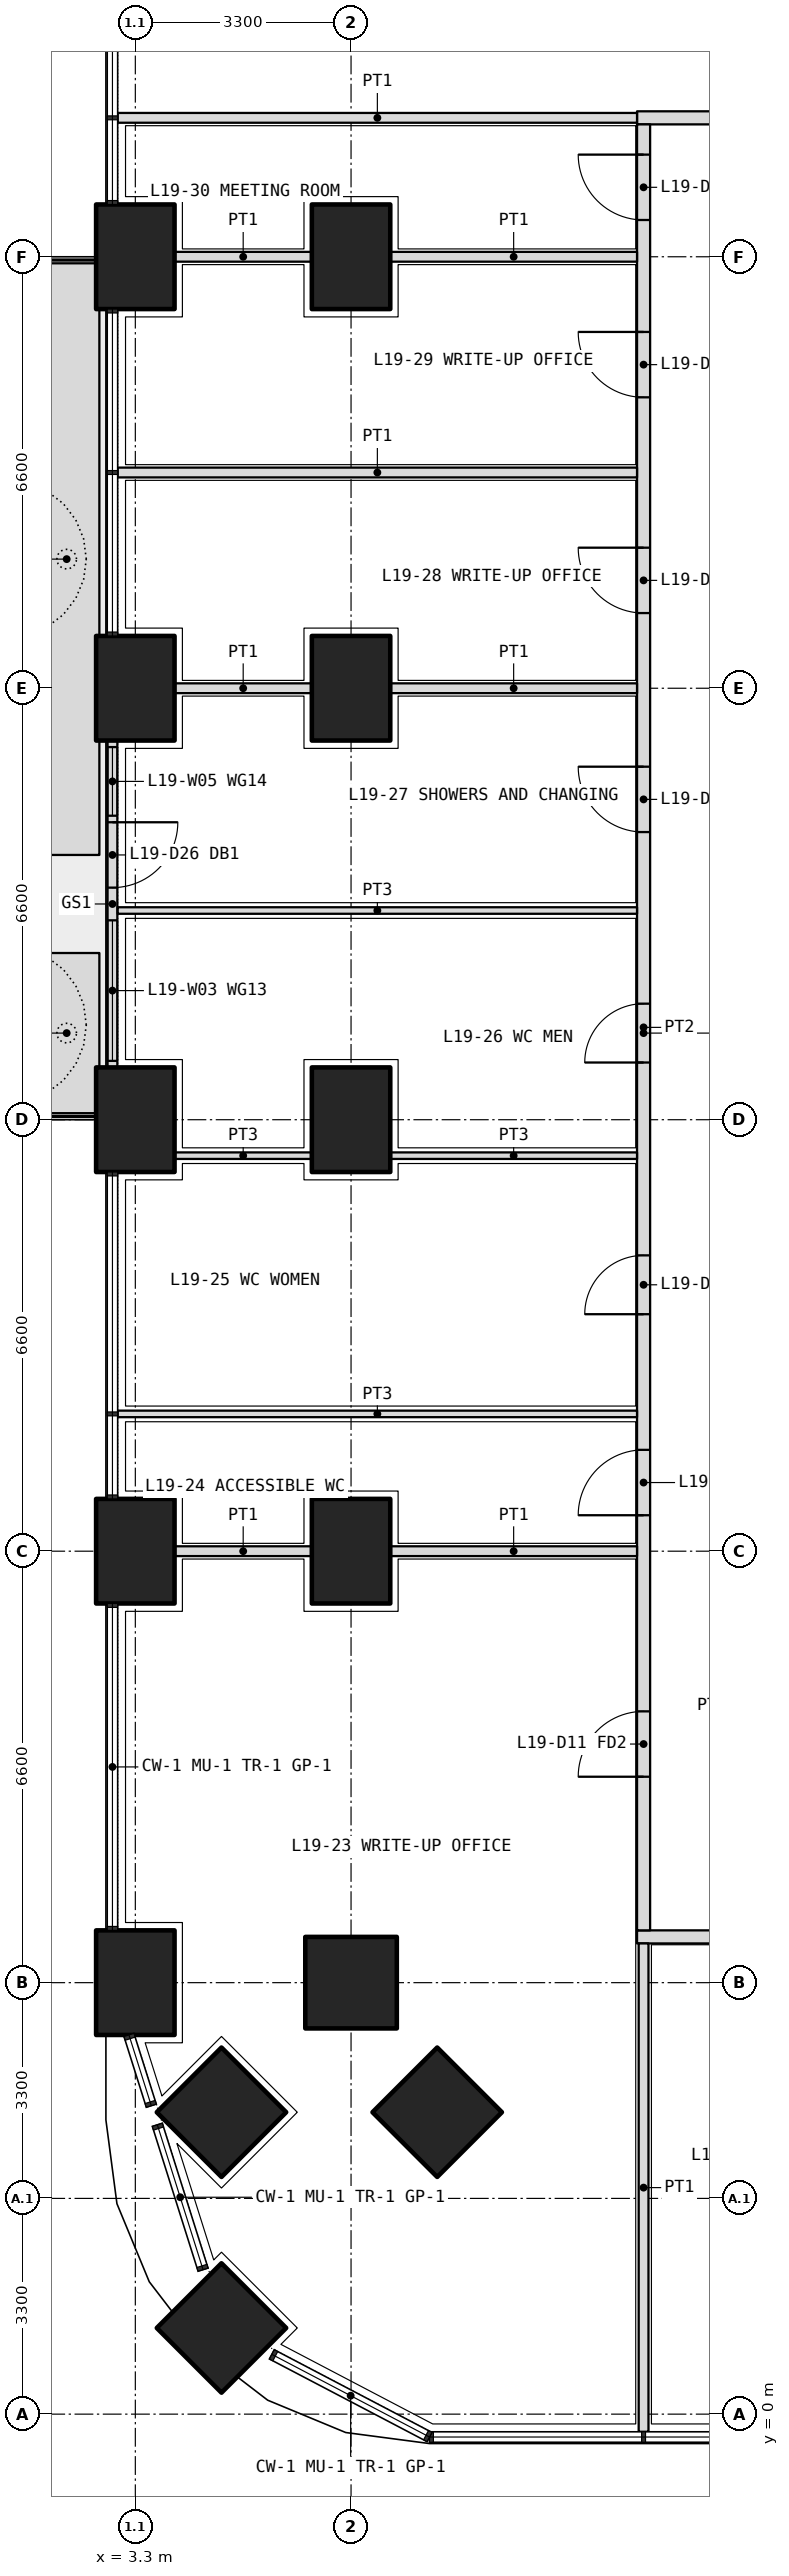
"""IFC4 building model, lengths in metres.
Left out: names, types, materials, properties, quantities, classifications, styles, units other than length and angle.
Written with IfcOpenShell. Run it as: python <this file> out.ifc"""

import sys

from ifc_helpers import new_model, si_unit, direction, frame, frame_2d, origin, origin_2d, place, context, subcontext, project, spatial, polyline, rectangle, outline, extrude, element, fill, save


model = new_model("IFC4")
c1 = context("Model", 3, precision=1e-05, world=origin(), true_north=direction((0.0, 1.0)))
c2 = subcontext(c1, "Body", "Model", "MODEL_VIEW")
j1 = project(units=[si_unit("LENGTHUNIT", "METRE"), si_unit("PLANEANGLEUNIT", "RADIAN")], contexts=[c1])
p1 = place(None, origin())
s1 = spatial("IfcSite", under=j1, at=p1, CompositionType="ELEMENT")
p2 = place(p1, origin())
s2 = spatial("IfcBuilding", under=s1, at=p2, CompositionType="ELEMENT")
p3 = place(p2, frame((0.0, 0.0, 86.4)))
s3 = spatial("IfcBuildingStorey", under=s2, at=p3, CompositionType="ELEMENT", Elevation=86.4)
p4 = place(p3, frame((4.618, 1.318, 0.0), z_axis=(0.0, 0.0, 1.0), x_axis=(0.707106781187, 0.707106781187, 0.0)))
e1 = element("IfcColumn", 1, at=p4, inside=s3, PredefinedType="COLUMN", context=c2, shape_type="SweptSolid", body=[
    extrude(rectangle(XDim=1.4, YDim=1.4, at=origin_2d()), origin(), (0.0, 0.0, 1.0), 4.2),
])
for number, where, z_axis, x_axis in (
    (2, (3.3, 6.6, 0.0), (0.0, 0.0, 1.0), (0.0, 1.0, 0.0)),
    (3, (3.3, 13.2, 0.0), (0.0, 0.0, 1.0), (0.0, 1.0, 0.0)),
    (4, (3.3, 19.8, 0.0), (0.0, 0.0, 1.0), (0.0, 1.0, 0.0)),
    (5, (3.3, 26.4, 0.0), (0.0, 0.0, 1.0), (0.0, 1.0, 0.0)),
    (6, (3.3, 33.0, 0.0), (0.0, 0.0, 1.0), (0.0, 1.0, 0.0)),
):
    element("IfcColumn", number, at=place(p3, frame(where, z_axis=z_axis, x_axis=x_axis)), inside=s3, PredefinedType="COLUMN", context=c2, shape_type="SweptSolid", body=[
        extrude(rectangle(XDim=1.6, YDim=1.2, at=origin_2d()), origin(), (0.0, 0.0, 1.0), 4.2),
    ])
for number, where, z_axis, x_axis in (
    (7, (6.6, 6.6, 0.0), (0.0, 0.0, 1.0), (1.0, 0.0, 0.0)),
    (8, (4.618, 4.618, 0.0), (0.0, 0.0, 1.0), (0.707, 0.707, 0.0)),
    (9, (7.918, 4.618, 0.0), (0.0, 0.0, 1.0), (0.707, 0.707, 0.0)),
):
    element("IfcColumn", number, at=place(p3, frame(where, z_axis=z_axis, x_axis=x_axis)), inside=s3, PredefinedType="COLUMN", context=c2, shape_type="SweptSolid", body=[
        extrude(rectangle(XDim=1.4, YDim=1.4, at=origin_2d()), origin(), (0.0, 0.0, 1.0), 4.2),
    ])
for number, where, z_axis, x_axis in (
    (10, (6.6, 13.2, 0.0), (0.0, 0.0, 1.0), (0.0, 1.0, 0.0)),
    (11, (6.6, 19.8, 0.0), (0.0, 0.0, 1.0), (0.0, 1.0, 0.0)),
    (12, (6.6, 26.4, 0.0), (0.0, 0.0, 1.0), (0.0, 1.0, 0.0)),
    (13, (6.6, 33.0, 0.0), (0.0, 0.0, 1.0), (0.0, 1.0, 0.0)),
):
    element("IfcColumn", number, at=place(p3, frame(where, z_axis=z_axis, x_axis=x_axis)), inside=s3, PredefinedType="COLUMN", context=c2, shape_type="SweptSolid", body=[
        extrude(rectangle(XDim=1.6, YDim=1.2, at=origin_2d()), origin(), (0.0, 0.0, 1.0), 4.2),
    ])
p5 = place(p3, origin())
e14 = element("IfcWall", 14, at=p5, inside=s3, PredefinedType="USERDEFINED", context=c2, shape_type="SweptSolid", body=[
    extrude(outline(polyline([(1.75, 19.9), (2.75, 19.9), (2.75, 22.35), (1.75, 22.35), (1.75, 19.9)]), holes=[polyline([(1.9, 20.05), (2.6, 20.05), (2.6, 22.2), (1.9, 22.2), (1.9, 20.05)])]), origin(), (0.0, 0.0, 1.0), 1.05),
])
p6 = place(p3, origin())
e15 = element("IfcWall", 15, at=p6, inside=s3, PredefinedType="USERDEFINED", context=c2, shape_type="SweptSolid", body=[
    extrude(outline(polyline([(1.75, 23.85), (2.75, 23.85), (2.75, 32.9), (1.75, 32.9), (1.75, 23.85)]), holes=[polyline([(1.9, 24.0), (2.6, 24.0), (2.6, 32.75), (1.9, 32.75), (1.9, 24.0)])]), origin(), (0.0, 0.0, 1.0), 1.05),
])
p7 = place(p3, frame((2.95, 25.6, 0.0), z_axis=(0.0, 0.0, 1.0), x_axis=(0.0, -1.0, 0.0)))
e16 = element("IfcWall", 16, at=p7, inside=s3, PredefinedType="SOLIDWALL", context=c2, shape_type="SweptSolid", body=[
    extrude(rectangle(XDim=5.0, YDim=0.15, at=frame_2d((2.5, 0.0))), origin(), (0.0, 0.0, 1.0), 2.7),
])
p8 = place(p7, frame((1.25, 0.0, 0.0)))
e17 = element("IfcOpeningElement", 17, at=p8, cuts=e16, PredefinedType="OPENING", context=c2, shape_type="SweptSolid", body=[
    extrude(rectangle(XDim=1.0, YDim=2.4, at=frame_2d((0.5, 1.2))), frame((0.0, 0.085, 0.0), z_axis=(0.0, -1.0, 0.0), x_axis=(1.0, 0.0, 0.0)), (0.0, 0.0, 1.0), 0.17),
])
p9 = place(p7, frame((0.1, 0.0, 0.1)))
e18 = element("IfcOpeningElement", 18, at=p9, cuts=e16, PredefinedType="OPENING", context=c2, shape_type="SweptSolid", body=[
    extrude(rectangle(XDim=1.05, YDim=2.3, at=frame_2d((0.525, 1.15))), frame((0.0, 0.085, 0.0), z_axis=(0.0, -1.0, 0.0), x_axis=(1.0, 0.0, 0.0)), (0.0, 0.0, 1.0), 0.17),
])
p10 = place(p7, frame((2.75, 0.0, 0.1)))
e19 = element("IfcOpeningElement", 19, at=p10, cuts=e16, PredefinedType="OPENING", context=c2, shape_type="SweptSolid", body=[
    extrude(rectangle(XDim=2.15, YDim=2.3, at=frame_2d((1.075, 1.15))), frame((0.0, 0.085, 0.0), z_axis=(0.0, -1.0, 0.0), x_axis=(1.0, 0.0, 0.0)), (0.0, 0.0, 1.0), 0.17),
])
p11 = place(p3, frame((10.975, 7.3, 0.0), z_axis=(0.0, 0.0, 1.0), x_axis=(1.0, 0.0, 0.0)))
e20 = element("IfcWall", 20, at=p11, inside=s3, PredefinedType="PARTITIONING", context=c2, shape_type="SweptSolid", body=[
    extrude(rectangle(XDim=12.125, YDim=0.2, at=frame_2d((6.062, 0.0))), origin(), (0.0, 0.0, 1.0), 2.85),
])
p12 = place(p11, frame((2.312, 0.0, 0.0)))
e21 = element("IfcOpeningElement", 21, at=p12, cuts=e20, PredefinedType="OPENING", context=c2, shape_type="SweptSolid", body=[
    extrude(rectangle(XDim=1.0, YDim=2.1, at=frame_2d((0.5, 1.05))), frame((0.0, 0.11, 0.0), z_axis=(0.0, -1.0, 0.0), x_axis=(1.0, 0.0, 0.0)), (0.0, 0.0, 1.0), 0.22),
])
p13 = place(p11, frame((7.125, 0.0, 0.0)))
e22 = element("IfcOpeningElement", 22, at=p13, cuts=e20, PredefinedType="OPENING", context=c2, shape_type="SweptSolid", body=[
    extrude(rectangle(XDim=1.0, YDim=2.1, at=frame_2d((0.5, 1.05))), frame((0.0, 0.11, 0.0), z_axis=(0.0, -1.0, 0.0), x_axis=(1.0, 0.0, 0.0)), (0.0, 0.0, 1.0), 0.22),
])
p14 = place(p11, frame((10.425, 0.0, 0.0)))
e23 = element("IfcOpeningElement", 23, at=p14, cuts=e20, PredefinedType="OPENING", context=c2, shape_type="SweptSolid", body=[
    extrude(rectangle(XDim=1.0, YDim=2.1, at=frame_2d((0.5, 1.05))), frame((0.0, 0.11, 0.0), z_axis=(0.0, -1.0, 0.0), x_axis=(1.0, 0.0, 0.0)), (0.0, 0.0, 1.0), 0.22),
])
p15 = place(p3, frame((10.975, 35.125, 0.0), z_axis=(0.0, 0.0, 1.0), x_axis=(1.0, 0.0, 0.0)))
e24 = element("IfcWall", 24, at=p15, inside=s3, PredefinedType="PARTITIONING", context=c2, shape_type="SweptSolid", body=[
    extrude(rectangle(XDim=30.85, YDim=0.2, at=frame_2d((15.425, 0.0))), origin(), (0.0, 0.0, 1.0), 2.85),
])
p16 = place(p15, frame((3.962, 0.0, 0.0)))
e25 = element("IfcOpeningElement", 25, at=p16, cuts=e24, PredefinedType="OPENING", context=c2, shape_type="SweptSolid", body=[
    extrude(rectangle(XDim=1.0, YDim=2.1, at=frame_2d((0.5, 1.05))), frame((0.0, 0.11, 0.0), z_axis=(0.0, -1.0, 0.0), x_axis=(1.0, 0.0, 0.0)), (0.0, 0.0, 1.0), 0.22),
])
p17 = place(p15, frame((9.975, 0.0, 0.0)))
e26 = element("IfcOpeningElement", 26, at=p17, cuts=e24, PredefinedType="OPENING", context=c2, shape_type="SweptSolid", body=[
    extrude(rectangle(XDim=1.0, YDim=2.1, at=frame_2d((0.5, 1.05))), frame((0.0, 0.11, 0.0), z_axis=(0.0, -1.0, 0.0), x_axis=(1.0, 0.0, 0.0)), (0.0, 0.0, 1.0), 0.22),
])
p18 = place(p15, frame((14.825, 0.0, 0.0)))
e27 = element("IfcOpeningElement", 27, at=p18, cuts=e24, PredefinedType="OPENING", context=c2, shape_type="SweptSolid", body=[
    extrude(rectangle(XDim=1.2, YDim=2.1, at=frame_2d((0.6, 1.05))), frame((0.0, 0.11, 0.0), z_axis=(0.0, -1.0, 0.0), x_axis=(1.0, 0.0, 0.0)), (0.0, 0.0, 1.0), 0.22),
])
p19 = place(p15, frame((24.238, 0.0, 0.0)))
e28 = element("IfcOpeningElement", 28, at=p19, cuts=e24, PredefinedType="OPENING", context=c2, shape_type="SweptSolid", body=[
    extrude(rectangle(XDim=1.0, YDim=2.1, at=frame_2d((0.5, 1.05))), frame((0.0, 0.11, 0.0), z_axis=(0.0, -1.0, 0.0), x_axis=(1.0, 0.0, 0.0)), (0.0, 0.0, 1.0), 0.22),
])
p20 = place(p3, frame((11.075, 7.4, 0.0), z_axis=(0.0, 0.0, 1.0), x_axis=(0.0, 1.0, 0.0)))
e29 = element("IfcWall", 29, at=p20, inside=s3, PredefinedType="PARTITIONING", context=c2, shape_type="SweptSolid", body=[
    extrude(rectangle(XDim=27.625, YDim=0.2, at=frame_2d((13.812, 0.0))), origin(), (0.0, 0.0, 1.0), 2.85),
])
p21 = place(p20, frame((2.35, 0.0, 0.0)))
e30 = element("IfcOpeningElement", 30, at=p21, cuts=e29, PredefinedType="OPENING", context=c2, shape_type="SweptSolid", body=[
    extrude(rectangle(XDim=1.0, YDim=2.1, at=frame_2d((0.5, 1.05))), frame((0.0, 0.11, 0.0), z_axis=(0.0, -1.0, 0.0), x_axis=(1.0, 0.0, 0.0)), (0.0, 0.0, 1.0), 0.22),
])
p22 = place(p20, frame((6.35, 0.0, 0.0)))
e31 = element("IfcOpeningElement", 31, at=p22, cuts=e29, PredefinedType="OPENING", context=c2, shape_type="SweptSolid", body=[
    extrude(rectangle(XDim=1.0, YDim=2.1, at=frame_2d((0.5, 1.05))), frame((0.0, 0.11, 0.0), z_axis=(0.0, -1.0, 0.0), x_axis=(1.0, 0.0, 0.0)), (0.0, 0.0, 1.0), 0.22),
])
p23 = place(p20, frame((9.425, 0.0, 0.0)))
e32 = element("IfcOpeningElement", 32, at=p23, cuts=e29, PredefinedType="OPENING", context=c2, shape_type="SweptSolid", body=[
    extrude(rectangle(XDim=0.9, YDim=2.1, at=frame_2d((0.45, 1.05))), frame((0.0, 0.11, 0.0), z_axis=(0.0, -1.0, 0.0), x_axis=(1.0, 0.0, 0.0)), (0.0, 0.0, 1.0), 0.22),
])
p24 = place(p20, frame((13.275, 0.0, 0.0)))
e33 = element("IfcOpeningElement", 33, at=p24, cuts=e29, PredefinedType="OPENING", context=c2, shape_type="SweptSolid", body=[
    extrude(rectangle(XDim=0.9, YDim=2.1, at=frame_2d((0.45, 1.05))), frame((0.0, 0.11, 0.0), z_axis=(0.0, -1.0, 0.0), x_axis=(1.0, 0.0, 0.0)), (0.0, 0.0, 1.0), 0.22),
])
p25 = place(p20, frame((16.8, 0.0, 0.0)))
e34 = element("IfcOpeningElement", 34, at=p25, cuts=e29, PredefinedType="OPENING", context=c2, shape_type="SweptSolid", body=[
    extrude(rectangle(XDim=1.0, YDim=2.1, at=frame_2d((0.5, 1.05))), frame((0.0, 0.11, 0.0), z_axis=(0.0, -1.0, 0.0), x_axis=(1.0, 0.0, 0.0)), (0.0, 0.0, 1.0), 0.22),
])
p26 = place(p20, frame((20.15, 0.0, 0.0)))
e35 = element("IfcOpeningElement", 35, at=p26, cuts=e29, PredefinedType="OPENING", context=c2, shape_type="SweptSolid", body=[
    extrude(rectangle(XDim=1.0, YDim=2.1, at=frame_2d((0.5, 1.05))), frame((0.0, 0.11, 0.0), z_axis=(0.0, -1.0, 0.0), x_axis=(1.0, 0.0, 0.0)), (0.0, 0.0, 1.0), 0.22),
])
p27 = place(p20, frame((23.45, 0.0, 0.0)))
e36 = element("IfcOpeningElement", 36, at=p27, cuts=e29, PredefinedType="OPENING", context=c2, shape_type="SweptSolid", body=[
    extrude(rectangle(XDim=1.0, YDim=2.1, at=frame_2d((0.5, 1.05))), frame((0.0, 0.11, 0.0), z_axis=(0.0, -1.0, 0.0), x_axis=(1.0, 0.0, 0.0)), (0.0, 0.0, 1.0), 0.22),
])
p28 = place(p20, frame((26.163, 0.0, 0.0)))
e37 = element("IfcOpeningElement", 37, at=p28, cuts=e29, PredefinedType="OPENING", context=c2, shape_type="SweptSolid", body=[
    extrude(rectangle(XDim=1.0, YDim=2.1, at=frame_2d((0.5, 1.05))), frame((0.0, 0.11, 0.0), z_axis=(0.0, -1.0, 0.0), x_axis=(1.0, 0.0, 0.0)), (0.0, 0.0, 1.0), 0.22),
])
p29 = place(p3, frame((11.075, -0.27, 0.0), z_axis=(0.0, 0.0, 1.0), x_axis=(0.0, 1.0, 0.0)))
e38 = element("IfcWall", 38, at=p29, inside=s3, PredefinedType="PARTITIONING", context=c2, shape_type="SweptSolid", body=[
    extrude(rectangle(XDim=7.47, YDim=0.15, at=frame_2d((3.735, 0.0))), origin(), (0.0, 0.0, 1.0), 2.7),
])
p30 = place(p3, frame((3.03, 35.125, 0.0), z_axis=(0.0, 0.0, 1.0), x_axis=(1.0, 0.0, 0.0)))
e39 = element("IfcWall", 39, at=p30, inside=s3, PredefinedType="PARTITIONING", context=c2, shape_type="SweptSolid", body=[
    extrude(rectangle(XDim=7.945, YDim=0.15, at=frame_2d((3.973, 0.0))), origin(), (0.0, 0.0, 1.0), 2.7),
])
p31 = place(p3, frame((3.03, 15.3, 0.0), z_axis=(0.0, 0.0, 1.0), x_axis=(1.0, 0.0, 0.0)))
e40 = element("IfcWall", 40, at=p31, inside=s3, PredefinedType="PARTITIONING", context=c2, shape_type="SweptSolid", body=[
    extrude(rectangle(XDim=7.945, YDim=0.1, at=frame_2d((3.973, 0.0))), origin(), (0.0, 0.0, 1.0), 2.7),
])
p32 = place(p3, frame((3.9, 19.25, 0.0), z_axis=(0.0, 0.0, 1.0), x_axis=(1.0, 0.0, 0.0)))
e41 = element("IfcWall", 41, at=p32, inside=s3, PredefinedType="PARTITIONING", context=c2, shape_type="SweptSolid", body=[
    extrude(rectangle(XDim=2.1, YDim=0.1, at=frame_2d((1.05, 0.0))), origin(), (0.0, 0.0, 1.0), 2.85),
])
p33 = place(p3, frame((7.2, 19.25, 0.0), z_axis=(0.0, 0.0, 1.0), x_axis=(1.0, 0.0, 0.0)))
e42 = element("IfcWall", 42, at=p33, inside=s3, PredefinedType="PARTITIONING", context=c2, shape_type="SweptSolid", body=[
    extrude(rectangle(XDim=3.775, YDim=0.1, at=frame_2d((1.888, 0.0))), origin(), (0.0, 0.0, 1.0), 2.85),
])
p34 = place(p3, frame((3.03, 23.0, 0.0), z_axis=(0.0, 0.0, 1.0), x_axis=(1.0, 0.0, 0.0)))
e43 = element("IfcWall", 43, at=p34, inside=s3, PredefinedType="PARTITIONING", context=c2, shape_type="SweptSolid", body=[
    extrude(rectangle(XDim=7.945, YDim=0.1, at=frame_2d((3.973, 0.0))), origin(), (0.0, 0.0, 1.0), 2.7),
])
p35 = place(p3, frame((3.9, 13.2, 0.0), z_axis=(0.0, 0.0, 1.0), x_axis=(1.0, 0.0, 0.0)))
e44 = element("IfcWall", 44, at=p35, inside=s3, PredefinedType="PARTITIONING", context=c2, shape_type="SweptSolid", body=[
    extrude(rectangle(XDim=2.1, YDim=0.15, at=frame_2d((1.05, 0.0))), origin(), (0.0, 0.0, 1.0), 2.85),
])
p36 = place(p3, frame((7.2, 13.2, 0.0), z_axis=(0.0, 0.0, 1.0), x_axis=(1.0, 0.0, 0.0)))
e45 = element("IfcWall", 45, at=p36, inside=s3, PredefinedType="PARTITIONING", context=c2, shape_type="SweptSolid", body=[
    extrude(rectangle(XDim=3.775, YDim=0.15, at=frame_2d((1.888, 0.0))), origin(), (0.0, 0.0, 1.0), 2.85),
])
p37 = place(p3, frame((3.9, 26.4, 0.0), z_axis=(0.0, 0.0, 1.0), x_axis=(1.0, 0.0, 0.0)))
e46 = element("IfcWall", 46, at=p37, inside=s3, PredefinedType="PARTITIONING", context=c2, shape_type="SweptSolid", body=[
    extrude(rectangle(XDim=2.1, YDim=0.15, at=frame_2d((1.05, 0.0))), origin(), (0.0, 0.0, 1.0), 2.85),
])
p38 = place(p3, frame((7.2, 26.4, 0.0), z_axis=(0.0, 0.0, 1.0), x_axis=(1.0, 0.0, 0.0)))
e47 = element("IfcWall", 47, at=p38, inside=s3, PredefinedType="PARTITIONING", context=c2, shape_type="SweptSolid", body=[
    extrude(rectangle(XDim=3.775, YDim=0.15, at=frame_2d((1.888, 0.0))), origin(), (0.0, 0.0, 1.0), 2.85),
])
p39 = place(p3, frame((3.03, 29.7, 0.0), z_axis=(0.0, 0.0, 1.0), x_axis=(1.0, 0.0, 0.0)))
e48 = element("IfcWall", 48, at=p39, inside=s3, PredefinedType="PARTITIONING", context=c2, shape_type="SweptSolid", body=[
    extrude(rectangle(XDim=7.945, YDim=0.15, at=frame_2d((3.973, 0.0))), origin(), (0.0, 0.0, 1.0), 2.7),
])
p40 = place(p3, frame((3.9, 33.0, 0.0), z_axis=(0.0, 0.0, 1.0), x_axis=(1.0, 0.0, 0.0)))
e49 = element("IfcWall", 49, at=p40, inside=s3, PredefinedType="PARTITIONING", context=c2, shape_type="SweptSolid", body=[
    extrude(rectangle(XDim=2.1, YDim=0.15, at=frame_2d((1.05, 0.0))), origin(), (0.0, 0.0, 1.0), 2.85),
])
p41 = place(p3, frame((7.2, 33.0, 0.0), z_axis=(0.0, 0.0, 1.0), x_axis=(1.0, 0.0, 0.0)))
e50 = element("IfcWall", 50, at=p41, inside=s3, PredefinedType="PARTITIONING", context=c2, shape_type="SweptSolid", body=[
    extrude(rectangle(XDim=3.775, YDim=0.15, at=frame_2d((1.888, 0.0))), origin(), (0.0, 0.0, 1.0), 2.85),
])
p42 = place(p8, origin())
e51 = element("IfcDoor", 51, at=p42, inside=s3, OperationType="SINGLE_SWING_LEFT", PredefinedType="DOOR", context=c2, shape_type="SweptSolid", body=[
    extrude(rectangle(XDim=1.0, YDim=2.4, at=frame_2d((0.5, 1.2))), frame((0.0, 0.025, 0.0), z_axis=(0.0, -1.0, 0.0), x_axis=(1.0, 0.0, 0.0)), (0.0, 0.0, 1.0), 0.05),
])
fill(e17, e51)
p43 = place(p9, origin())
e52 = element("IfcWindow", 52, at=p43, inside=s3, PartitioningType="SINGLE_PANEL", PredefinedType="WINDOW", context=c2, shape_type="SweptSolid", body=[
    extrude(rectangle(XDim=1.05, YDim=2.3, at=frame_2d((0.525, 1.15))), frame((0.0, 0.03, 0.0), z_axis=(0.0, -1.0, 0.0), x_axis=(1.0, 0.0, 0.0)), (0.0, 0.0, 1.0), 0.06),
])
fill(e18, e52)
p44 = place(p10, origin())
e53 = element("IfcWindow", 53, at=p44, inside=s3, PartitioningType="SINGLE_PANEL", PredefinedType="WINDOW", context=c2, shape_type="SweptSolid", body=[
    extrude(rectangle(XDim=2.15, YDim=2.3, at=frame_2d((1.075, 1.15))), frame((0.0, 0.03, 0.0), z_axis=(0.0, -1.0, 0.0), x_axis=(1.0, 0.0, 0.0)), (0.0, 0.0, 1.0), 0.06),
])
fill(e19, e53)
p45 = place(p21, origin())
e54 = element("IfcDoor", 54, at=p45, inside=s3, OperationType="SINGLE_SWING_LEFT", PredefinedType="DOOR", context=c2, shape_type="SweptSolid", body=[
    extrude(rectangle(XDim=1.0, YDim=2.1, at=frame_2d((0.5, 1.05))), frame((0.0, 0.025, 0.0), z_axis=(0.0, -1.0, 0.0), x_axis=(1.0, 0.0, 0.0)), (0.0, 0.0, 1.0), 0.05),
])
fill(e30, e54)
p46 = place(p22, origin())
e55 = element("IfcDoor", 55, at=p46, inside=s3, OperationType="SINGLE_SWING_LEFT", PredefinedType="DOOR", context=c2, shape_type="SweptSolid", body=[
    extrude(rectangle(XDim=1.0, YDim=2.1, at=frame_2d((0.5, 1.05))), frame((0.0, 0.025, 0.0), z_axis=(0.0, -1.0, 0.0), x_axis=(1.0, 0.0, 0.0)), (0.0, 0.0, 1.0), 0.05),
])
fill(e31, e55)
p47 = place(p23, origin())
e56 = element("IfcDoor", 56, at=p47, inside=s3, OperationType="SINGLE_SWING_LEFT", PredefinedType="DOOR", context=c2, shape_type="SweptSolid", body=[
    extrude(rectangle(XDim=0.9, YDim=2.1, at=frame_2d((0.45, 1.05))), frame((0.0, 0.025, 0.0), z_axis=(0.0, -1.0, 0.0), x_axis=(1.0, 0.0, 0.0)), (0.0, 0.0, 1.0), 0.05),
])
fill(e32, e56)
p48 = place(p24, origin())
e57 = element("IfcDoor", 57, at=p48, inside=s3, OperationType="SINGLE_SWING_LEFT", PredefinedType="DOOR", context=c2, shape_type="SweptSolid", body=[
    extrude(rectangle(XDim=0.9, YDim=2.1, at=frame_2d((0.45, 1.05))), frame((0.0, 0.025, 0.0), z_axis=(0.0, -1.0, 0.0), x_axis=(1.0, 0.0, 0.0)), (0.0, 0.0, 1.0), 0.05),
])
fill(e33, e57)
p49 = place(p25, origin())
e58 = element("IfcDoor", 58, at=p49, inside=s3, OperationType="SINGLE_SWING_RIGHT", PredefinedType="DOOR", context=c2, shape_type="SweptSolid", body=[
    extrude(rectangle(XDim=1.0, YDim=2.1, at=frame_2d((0.5, 1.05))), frame((0.0, 0.025, 0.0), z_axis=(0.0, -1.0, 0.0), x_axis=(1.0, 0.0, 0.0)), (0.0, 0.0, 1.0), 0.05),
])
fill(e34, e58)
p50 = place(p26, origin())
e59 = element("IfcDoor", 59, at=p50, inside=s3, OperationType="SINGLE_SWING_RIGHT", PredefinedType="DOOR", context=c2, shape_type="SweptSolid", body=[
    extrude(rectangle(XDim=1.0, YDim=2.1, at=frame_2d((0.5, 1.05))), frame((0.0, 0.025, 0.0), z_axis=(0.0, -1.0, 0.0), x_axis=(1.0, 0.0, 0.0)), (0.0, 0.0, 1.0), 0.05),
])
fill(e35, e59)
p51 = place(p27, origin())
e60 = element("IfcDoor", 60, at=p51, inside=s3, OperationType="SINGLE_SWING_RIGHT", PredefinedType="DOOR", context=c2, shape_type="SweptSolid", body=[
    extrude(rectangle(XDim=1.0, YDim=2.1, at=frame_2d((0.5, 1.05))), frame((0.0, 0.025, 0.0), z_axis=(0.0, -1.0, 0.0), x_axis=(1.0, 0.0, 0.0)), (0.0, 0.0, 1.0), 0.05),
])
fill(e36, e60)
p52 = place(p28, origin())
e61 = element("IfcDoor", 61, at=p52, inside=s3, OperationType="SINGLE_SWING_RIGHT", PredefinedType="DOOR", context=c2, shape_type="SweptSolid", body=[
    extrude(rectangle(XDim=1.0, YDim=2.1, at=frame_2d((0.5, 1.05))), frame((0.0, 0.025, 0.0), z_axis=(0.0, -1.0, 0.0), x_axis=(1.0, 0.0, 0.0)), (0.0, 0.0, 1.0), 0.05),
])
fill(e37, e61)
save(model, sys.argv[1])
